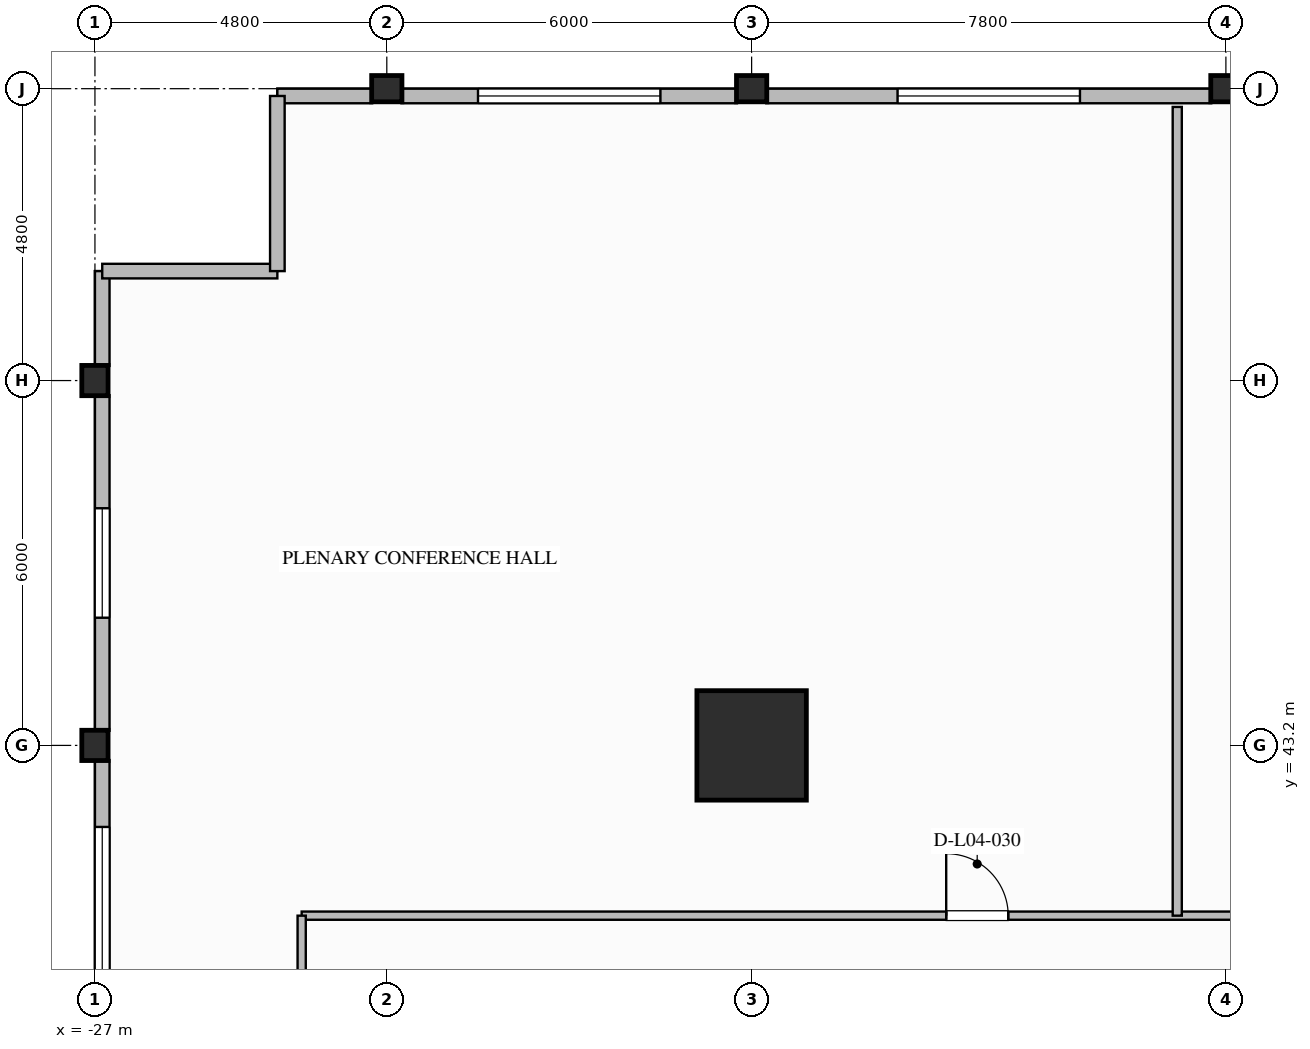
"""IFC4 building model, lengths in metres.
Left out: names, types, materials, properties, quantities, classifications, styles, units other than length and angle.
Written with IfcOpenShell. Run it as: python <this file> out.ifc"""

import sys

from ifc_helpers import new_model, si_unit, direction, frame, frame_2d, origin, origin_2d, place, context, subcontext, project, spatial, rectangle, i_section, extrude, element, fill, save


model = new_model("IFC4")
c1 = context("Model", 3, precision=1e-05, world=origin(), true_north=direction((0.0, 1.0)))
c2 = subcontext(c1, "Body", "Model", "MODEL_VIEW")
j1 = project(units=[si_unit("LENGTHUNIT", "METRE"), si_unit("PLANEANGLEUNIT", "RADIAN")], contexts=[c1])
p1 = place(None, origin())
s1 = spatial("IfcSite", under=j1, at=p1, CompositionType="ELEMENT")
p2 = place(p1, origin())
s2 = spatial("IfcBuilding", under=s1, at=p2, CompositionType="ELEMENT")
p3 = place(p2, frame((0.0, 0.0, 22.4)))
s3 = spatial("IfcBuildingStorey", under=s2, at=p3, CompositionType="ELEMENT", Elevation=22.4)
p4 = place(p3, frame((-16.2, 43.2, 0.0), z_axis=(0.0, 0.0, 1.0), x_axis=(1.0, 0.0, 0.0)))
e1 = element("IfcColumn", 1, at=p4, inside=s3, PredefinedType="COLUMN", context=c2, shape_type="SweptSolid", body=[
    extrude(rectangle(XDim=1.8, YDim=1.8, at=origin_2d()), origin(), (0.0, 0.0, 1.0), 5.2),
])
for number, where, z_axis, x_axis in (
    (2, (-27.0, 43.2, 0.0), (0.0, 0.0, 1.0), (1.0, 0.0, 0.0)),
    (3, (-27.0, 49.2, 0.0), (0.0, 0.0, 1.0), (1.0, 0.0, 0.0)),
    (4, (-22.2, 54.0, 0.0), (0.0, 0.0, 1.0), (0.0, 1.0, 0.0)),
    (5, (-16.2, 54.0, 0.0), (0.0, 0.0, 1.0), (0.0, 1.0, 0.0)),
    (6, (-8.4, 54.0, 0.0), (0.0, 0.0, 1.0), (0.0, 1.0, 0.0)),
):
    element("IfcColumn", number, at=place(p3, frame(where, z_axis=z_axis, x_axis=x_axis)), inside=s3, PredefinedType="COLUMN", context=c2, shape_type="SweptSolid", body=[
        extrude(i_section(OverallWidth=0.432, OverallDepth=0.498, WebThickness=0.056, FlangeThickness=0.089, FilletRadius=0.03, at=origin_2d()), origin(), (0.0, 0.0, 1.0), 5.2),
    ])
p5 = place(p3, frame((-26.88, 35.641, 0.0), z_axis=(0.0, 0.0, 1.0), x_axis=(0.0, 1.0, 0.0)))
e7 = element("IfcWall", 7, at=p5, inside=s3, PredefinedType="STANDARD", context=c2, shape_type="SweptSolid", body=[
    extrude(rectangle(XDim=7.318, YDim=0.24, at=frame_2d((3.659, 0.0))), origin(), (0.0, 0.0, 1.0), 4.155),
])
p6 = place(p5, frame((1.1, 0.0, 0.7)))
e8 = element("IfcOpeningElement", 8, at=p6, cuts=e7, PredefinedType="OPENING", context=c2, shape_type="SweptSolid", body=[
    extrude(rectangle(XDim=2.4, YDim=2.4, at=frame_2d((1.2, 1.2))), frame((0.0, 0.13, 0.0), z_axis=(0.0, -1.0, 0.0), x_axis=(1.0, 0.0, 0.0)), (0.0, 0.0, 1.0), 0.26),
])
p7 = place(p5, frame((3.818, 0.0, 0.7)))
e9 = element("IfcOpeningElement", 9, at=p7, cuts=e7, PredefinedType="OPENING", context=c2, shape_type="SweptSolid", body=[
    extrude(rectangle(XDim=2.4, YDim=2.4, at=frame_2d((1.2, 1.2))), frame((0.0, 0.13, 0.0), z_axis=(0.0, -1.0, 0.0), x_axis=(1.0, 0.0, 0.0)), (0.0, 0.0, 1.0), 0.26),
])
p8 = place(p3, frame((-26.88, 43.441, 0.0), z_axis=(0.0, 0.0, 1.0), x_axis=(0.0, 1.0, 0.0)))
e10 = element("IfcWall", 10, at=p8, inside=s3, PredefinedType="STANDARD", context=c2, shape_type="SweptSolid", body=[
    extrude(rectangle(XDim=5.518, YDim=0.24, at=frame_2d((2.759, 0.0))), origin(), (0.0, 0.0, 1.0), 4.155),
])
p9 = place(p8, frame((1.859, 0.0, 0.7)))
e11 = element("IfcOpeningElement", 11, at=p9, cuts=e10, PredefinedType="OPENING", context=c2, shape_type="SweptSolid", body=[
    extrude(rectangle(XDim=1.8, YDim=2.2, at=frame_2d((0.9, 1.1))), frame((0.0, 0.13, 0.0), z_axis=(0.0, -1.0, 0.0), x_axis=(1.0, 0.0, 0.0)), (0.0, 0.0, 1.0), 0.26),
])
for number, where, z_axis, x_axis in (
    (12, (-26.88, 49.441, 0.0), (0.0, 0.0, 1.0), (0.0, 1.0, 0.0)),
    (13, (-24.0, 53.88, 0.0), (0.0, 0.0, 1.0), (1.0, 0.0, 0.0)),
):
    element("IfcWall", number, at=place(p3, frame(where, z_axis=z_axis, x_axis=x_axis)), inside=s3, PredefinedType="STANDARD", context=c2, shape_type="SweptSolid", body=[
        extrude(rectangle(XDim=1.559, YDim=0.24, at=frame_2d((0.78, 0.0))), origin(), (0.0, 0.0, 1.0), 4.85),
    ])
p10 = place(p3, frame((-21.959, 53.88, 0.0), z_axis=(0.0, 0.0, 1.0), x_axis=(1.0, 0.0, 0.0)))
e14 = element("IfcWall", 14, at=p10, inside=s3, PredefinedType="STANDARD", context=c2, shape_type="SweptSolid", body=[
    extrude(rectangle(XDim=5.518, YDim=0.24, at=frame_2d((2.759, 0.0))), origin(), (0.0, 0.0, 1.0), 4.155),
])
p11 = place(p10, frame((1.259, 0.0, 0.65)))
e15 = element("IfcOpeningElement", 15, at=p11, cuts=e14, PredefinedType="OPENING", context=c2, shape_type="SweptSolid", body=[
    extrude(rectangle(XDim=3.0, YDim=2.2, at=frame_2d((1.5, 1.1))), frame((0.0, 0.13, 0.0), z_axis=(0.0, -1.0, 0.0), x_axis=(1.0, 0.0, 0.0)), (0.0, 0.0, 1.0), 0.26),
])
p12 = place(p3, frame((-15.959, 53.88, 0.0), z_axis=(0.0, 0.0, 1.0), x_axis=(1.0, 0.0, 0.0)))
e16 = element("IfcWall", 16, at=p12, inside=s3, PredefinedType="STANDARD", context=c2, shape_type="SweptSolid", body=[
    extrude(rectangle(XDim=7.318, YDim=0.24, at=frame_2d((3.659, 0.0))), origin(), (0.0, 0.0, 1.0), 4.155),
])
p13 = place(p12, frame((2.159, 0.0, 0.65)))
e17 = element("IfcOpeningElement", 17, at=p13, cuts=e16, PredefinedType="OPENING", context=c2, shape_type="SweptSolid", body=[
    extrude(rectangle(XDim=3.0, YDim=2.2, at=frame_2d((1.5, 1.1))), frame((0.0, 0.13, 0.0), z_axis=(0.0, -1.0, 0.0), x_axis=(1.0, 0.0, 0.0)), (0.0, 0.0, 1.0), 0.26),
])
for number, where, z_axis, x_axis in (
    (18, (-26.88, 51.0, 0.0), (0.0, 0.0, 1.0), (1.0, 0.0, 0.0)),
    (19, (-24.0, 51.0, 0.0), (0.0, 0.0, 1.0), (0.0, 1.0, 0.0)),
):
    element("IfcWall", number, at=place(p3, frame(where, z_axis=z_axis, x_axis=x_axis)), inside=s3, PredefinedType="STANDARD", context=c2, shape_type="SweptSolid", body=[
        extrude(rectangle(XDim=2.88, YDim=0.24, at=frame_2d((1.44, 0.0))), origin(), (0.0, 0.0, 1.0), 4.85),
    ])
p14 = place(p3, frame((-23.6, 40.4, 0.0), z_axis=(0.0, 0.0, 1.0), x_axis=(1.0, 0.0, 0.0)))
e20 = element("IfcWall", 20, at=p14, inside=s3, PredefinedType="PARTITIONING", context=c2, shape_type="SweptSolid", body=[
    extrude(rectangle(XDim=47.3, YDim=0.135, at=frame_2d((23.65, 0.0))), origin(), (0.0, 0.0, 1.0), 4.85),
])
p15 = place(p14, frame((41.88, 0.0, 0.0)))
e21 = element("IfcOpeningElement", 21, at=p15, cuts=e20, PredefinedType="OPENING", context=c2, shape_type="SweptSolid", body=[
    extrude(rectangle(XDim=0.98, YDim=2.1, at=frame_2d((0.49, 1.05))), frame((0.0, 0.077, 0.0), z_axis=(0.0, -1.0, 0.0), x_axis=(1.0, 0.0, 0.0)), (0.0, 0.0, 1.0), 0.155),
])
p16 = place(p14, frame((45.06, 0.0, 0.0)))
e22 = element("IfcOpeningElement", 22, at=p16, cuts=e20, PredefinedType="OPENING", context=c2, shape_type="SweptSolid", body=[
    extrude(rectangle(XDim=0.92, YDim=2.1, at=frame_2d((0.46, 1.05))), frame((0.0, 0.077, 0.0), z_axis=(0.0, -1.0, 0.0), x_axis=(1.0, 0.0, 0.0)), (0.0, 0.0, 1.0), 0.155),
])
p17 = place(p14, frame((10.6, 0.0, 0.0)))
e23 = element("IfcOpeningElement", 23, at=p17, cuts=e20, PredefinedType="OPENING", context=c2, shape_type="SweptSolid", body=[
    extrude(rectangle(XDim=1.02, YDim=2.15, at=frame_2d((0.51, 1.075))), frame((0.0, 0.077, 0.0), z_axis=(0.0, -1.0, 0.0), x_axis=(1.0, 0.0, 0.0)), (0.0, 0.0, 1.0), 0.155),
])
p18 = place(p14, frame((19.1, 0.0, 0.0)))
e24 = element("IfcOpeningElement", 24, at=p18, cuts=e20, PredefinedType="OPENING", context=c2, shape_type="SweptSolid", body=[
    extrude(rectangle(XDim=1.02, YDim=2.15, at=frame_2d((0.51, 1.075))), frame((0.0, 0.077, 0.0), z_axis=(0.0, -1.0, 0.0), x_axis=(1.0, 0.0, 0.0)), (0.0, 0.0, 1.0), 0.155),
])
p19 = place(p14, frame((29.6, 0.0, 0.0)))
e25 = element("IfcOpeningElement", 25, at=p19, cuts=e20, PredefinedType="OPENING", context=c2, shape_type="SweptSolid", body=[
    extrude(rectangle(XDim=1.02, YDim=2.15, at=frame_2d((0.51, 1.075))), frame((0.0, 0.077, 0.0), z_axis=(0.0, -1.0, 0.0), x_axis=(1.0, 0.0, 0.0)), (0.0, 0.0, 1.0), 0.155),
])
p20 = place(p3, frame((-23.6, 0.3, 0.0), z_axis=(0.0, 0.0, 1.0), x_axis=(0.0, 1.0, 0.0)))
e26 = element("IfcWall", 26, at=p20, inside=s3, PredefinedType="PARTITIONING", context=c2, shape_type="SweptSolid", body=[
    extrude(rectangle(XDim=40.1, YDim=0.135, at=frame_2d((20.05, 0.0))), origin(), (0.0, 0.0, 1.0), 4.85),
])
p21 = place(p20, frame((19.0, 0.0, 0.0)))
e27 = element("IfcOpeningElement", 27, at=p21, cuts=e26, PredefinedType="OPENING", context=c2, shape_type="SweptSolid", body=[
    extrude(rectangle(XDim=1.02, YDim=2.15, at=frame_2d((0.51, 1.075))), frame((0.0, 0.077, 0.0), z_axis=(0.0, -1.0, 0.0), x_axis=(1.0, 0.0, 0.0)), (0.0, 0.0, 1.0), 0.155),
])
p22 = place(p20, frame((28.5, 0.0, 0.0)))
e28 = element("IfcOpeningElement", 28, at=p22, cuts=e26, PredefinedType="OPENING", context=c2, shape_type="SweptSolid", body=[
    extrude(rectangle(XDim=1.02, YDim=2.15, at=frame_2d((0.51, 1.075))), frame((0.0, 0.077, 0.0), z_axis=(0.0, -1.0, 0.0), x_axis=(1.0, 0.0, 0.0)), (0.0, 0.0, 1.0), 0.155),
])
p23 = place(p20, frame((9.0, 0.0, 0.0)))
e29 = element("IfcOpeningElement", 29, at=p23, cuts=e26, PredefinedType="OPENING", context=c2, shape_type="SweptSolid", body=[
    extrude(rectangle(XDim=1.08, YDim=2.04, at=frame_2d((0.54, 1.02))), frame((0.0, 0.077, 0.0), z_axis=(0.0, -1.0, 0.0), x_axis=(1.0, 0.0, 0.0)), (0.0, 0.0, 1.0), 0.155),
])
p24 = place(p3, frame((-9.2, 40.4, 0.0), z_axis=(0.0, 0.0, 1.0), x_axis=(0.0, 1.0, 0.0)))
e30 = element("IfcWall", 30, at=p24, inside=s3, PredefinedType="PARTITIONING", context=c2, shape_type="SweptSolid", body=[
    extrude(rectangle(XDim=13.3, YDim=0.15, at=frame_2d((6.65, 0.0))), origin(), (0.0, 0.0, 1.0), 4.85),
])
p25 = place(p7, origin())
e31 = element("IfcWindow", 31, at=p25, inside=s3, PartitioningType="SINGLE_PANEL", PredefinedType="WINDOW", context=c2, shape_type="SweptSolid", body=[
    extrude(rectangle(XDim=2.4, YDim=2.4, at=frame_2d((1.2, 1.2))), frame((0.0, 0.03, 0.0), z_axis=(0.0, -1.0, 0.0), x_axis=(1.0, 0.0, 0.0)), (0.0, 0.0, 1.0), 0.06),
])
fill(e9, e31)
p26 = place(p9, origin())
e32 = element("IfcWindow", 32, at=p26, inside=s3, PartitioningType="SINGLE_PANEL", PredefinedType="WINDOW", context=c2, shape_type="SweptSolid", body=[
    extrude(rectangle(XDim=1.8, YDim=2.2, at=frame_2d((0.9, 1.1))), frame((0.0, 0.03, 0.0), z_axis=(0.0, -1.0, 0.0), x_axis=(1.0, 0.0, 0.0)), (0.0, 0.0, 1.0), 0.06),
])
fill(e11, e32)
p27 = place(p11, origin())
e33 = element("IfcWindow", 33, at=p27, inside=s3, PartitioningType="SINGLE_PANEL", PredefinedType="WINDOW", context=c2, shape_type="SweptSolid", body=[
    extrude(rectangle(XDim=3.0, YDim=2.2, at=frame_2d((1.5, 1.1))), frame((0.0, 0.03, 0.0), z_axis=(0.0, -1.0, 0.0), x_axis=(1.0, 0.0, 0.0)), (0.0, 0.0, 1.0), 0.06),
])
fill(e15, e33)
p28 = place(p13, origin())
e34 = element("IfcWindow", 34, at=p28, inside=s3, PartitioningType="SINGLE_PANEL", PredefinedType="WINDOW", context=c2, shape_type="SweptSolid", body=[
    extrude(rectangle(XDim=3.0, YDim=2.2, at=frame_2d((1.5, 1.1))), frame((0.0, 0.03, 0.0), z_axis=(0.0, -1.0, 0.0), x_axis=(1.0, 0.0, 0.0)), (0.0, 0.0, 1.0), 0.06),
])
fill(e17, e34)
p29 = place(p17, origin())
e35 = element("IfcDoor", 35, at=p29, inside=s3, OperationType="SINGLE_SWING_LEFT", PredefinedType="DOOR", context=c2, shape_type="SweptSolid", body=[
    extrude(rectangle(XDim=1.02, YDim=2.15, at=frame_2d((0.51, 1.075))), frame((0.0, 0.025, 0.0), z_axis=(0.0, -1.0, 0.0), x_axis=(1.0, 0.0, 0.0)), (0.0, 0.0, 1.0), 0.05),
])
fill(e23, e35)
save(model, sys.argv[1])
